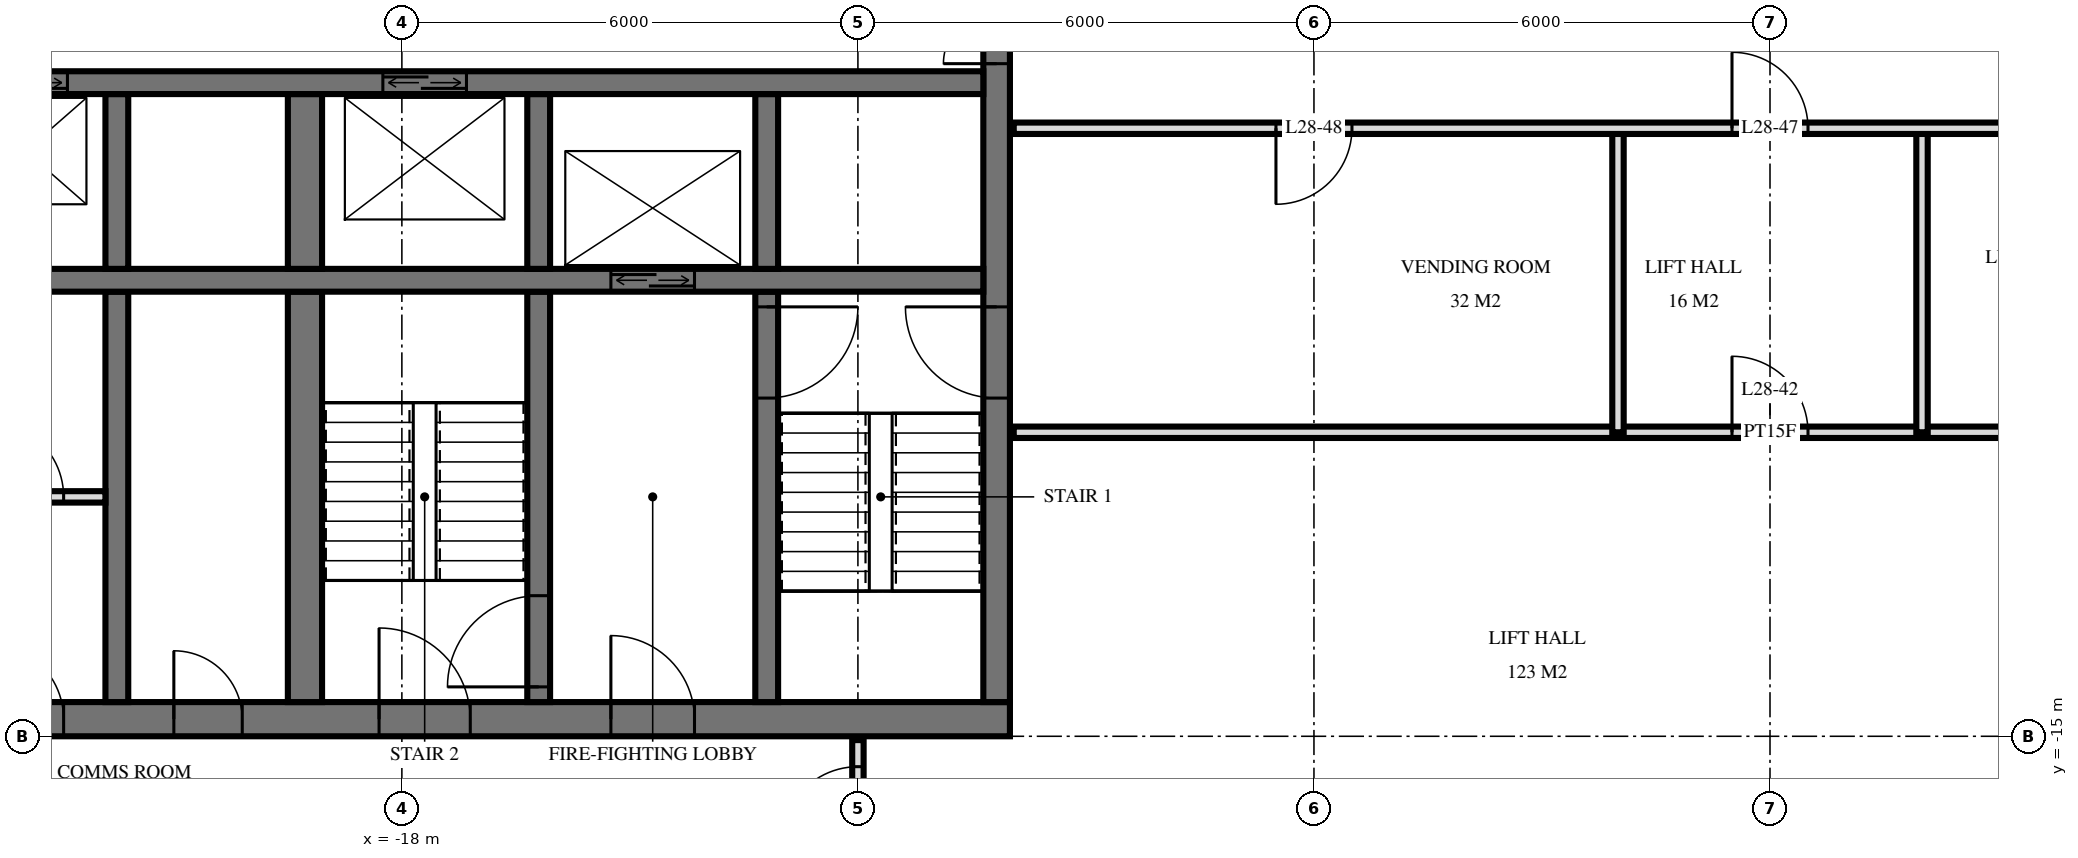
"""IFC4 building model, lengths in metres.
Left out: names, types, materials, properties, quantities, classifications, styles, units other than length and angle.
Written with IfcOpenShell. Run it as: python <this file> out.ifc"""

import sys

from ifc_helpers import new_model, si_unit, direction, frame, frame_2d, origin, place, context, subcontext, project, spatial, rectangle, extrude, element, fill, save


model = new_model("IFC4")
c1 = context("Model", 3, precision=1e-05, world=origin(), true_north=direction((0.0, 1.0)))
c2 = subcontext(c1, "Body", "Model", "MODEL_VIEW")
j1 = project(units=[si_unit("LENGTHUNIT", "METRE"), si_unit("PLANEANGLEUNIT", "RADIAN")], contexts=[c1])
p1 = place(None, origin())
s1 = spatial("IfcSite", under=j1, at=p1, CompositionType="ELEMENT")
p2 = place(p1, origin())
s2 = spatial("IfcBuilding", under=s1, at=p2, CompositionType="ELEMENT")
p3 = place(p2, frame((0.0, 0.0, 112.8)))
s3 = spatial("IfcBuildingStorey", under=s2, at=p3, CompositionType="ELEMENT", Elevation=112.8)
p4 = place(p3, frame((-24.5, -14.775, 0.0), z_axis=(0.0, 0.0, 1.0), x_axis=(1.0, 0.0, 0.0)))
e1 = element("IfcWall", 1, at=p4, inside=s3, PredefinedType="SHEAR", context=c2, shape_type="SweptSolid", body=[
    extrude(rectangle(XDim=14.5, YDim=0.45, at=frame_2d((7.25, 0.0))), origin(), (0.0, 0.0, 1.0), 3.6),
])
p5 = place(p4, frame((6.2, 0.0, 0.0)))
e2 = element("IfcOpeningElement", 2, at=p5, cuts=e1, PredefinedType="OPENING", context=c2, shape_type="SweptSolid", body=[
    extrude(rectangle(XDim=1.2, YDim=2.1, at=frame_2d((0.6, 1.05))), frame((0.0, 0.235, 0.0), z_axis=(0.0, -1.0, 0.0), x_axis=(1.0, 0.0, 0.0)), (0.0, 0.0, 1.0), 0.47),
])
p6 = place(p4, frame((9.25, 0.0, 0.0)))
e3 = element("IfcOpeningElement", 3, at=p6, cuts=e1, PredefinedType="OPENING", context=c2, shape_type="SweptSolid", body=[
    extrude(rectangle(XDim=1.1, YDim=2.1, at=frame_2d((0.55, 1.05))), frame((0.0, 0.235, 0.0), z_axis=(0.0, -1.0, 0.0), x_axis=(1.0, 0.0, 0.0)), (0.0, 0.0, 1.0), 0.47),
])
p7 = place(p4, frame((3.5, 0.0, 0.0)))
e4 = element("IfcOpeningElement", 4, at=p7, cuts=e1, PredefinedType="OPENING", context=c2, shape_type="SweptSolid", body=[
    extrude(rectangle(XDim=0.9, YDim=2.1, at=frame_2d((0.45, 1.05))), frame((0.0, 0.235, 0.0), z_axis=(0.0, -1.0, 0.0), x_axis=(1.0, 0.0, 0.0)), (0.0, 0.0, 1.0), 0.47),
])
p8 = place(p4, frame((1.05, 0.0, 0.0)))
e5 = element("IfcOpeningElement", 5, at=p8, cuts=e1, PredefinedType="OPENING", context=c2, shape_type="SweptSolid", body=[
    extrude(rectangle(XDim=1.0, YDim=2.1, at=frame_2d((0.5, 1.05))), frame((0.0, 0.235, 0.0), z_axis=(0.0, -1.0, 0.0), x_axis=(1.0, 0.0, 0.0)), (0.0, 0.0, 1.0), 0.47),
])
p9 = place(p3, frame((-10.175, -14.55, 0.0), z_axis=(0.0, 0.0, 1.0), x_axis=(0.0, 1.0, 0.0)))
e6 = element("IfcWall", 6, at=p9, inside=s3, PredefinedType="SHEAR", context=c2, shape_type="SweptSolid", body=[
    extrude(rectangle(XDim=14.1, YDim=0.35, at=frame_2d((7.05, 0.0))), origin(), (0.0, 0.0, 1.0), 3.6),
])
p10 = place(p9, frame((8.4, 0.0, 0.0)))
e7 = element("IfcOpeningElement", 7, at=p10, cuts=e6, PredefinedType="OPENING", context=c2, shape_type="SweptSolid", body=[
    extrude(rectangle(XDim=1.4, YDim=2.4, at=frame_2d((0.7, 1.2))), frame((0.0, 0.185, 0.0), z_axis=(0.0, -1.0, 0.0), x_axis=(1.0, 0.0, 0.0)), (0.0, 0.0, 1.0), 0.37),
])
p11 = place(p9, frame((10.0, 0.0, 0.0)))
e8 = element("IfcOpeningElement", 8, at=p11, cuts=e6, PredefinedType="OPENING", context=c2, shape_type="SweptSolid", body=[
    extrude(rectangle(XDim=1.4, YDim=2.4, at=frame_2d((0.7, 1.2))), frame((0.0, 0.185, 0.0), z_axis=(0.0, -1.0, 0.0), x_axis=(1.0, 0.0, 0.0)), (0.0, 0.0, 1.0), 0.37),
])
p12 = place(p9, frame((4.0, 0.0, 0.0)))
e9 = element("IfcOpeningElement", 9, at=p12, cuts=e6, PredefinedType="OPENING", context=c2, shape_type="SweptSolid", body=[
    extrude(rectangle(XDim=1.2, YDim=2.1, at=frame_2d((0.6, 1.05))), frame((0.0, 0.185, 0.0), z_axis=(0.0, -1.0, 0.0), x_axis=(1.0, 0.0, 0.0)), (0.0, 0.0, 1.0), 0.37),
])
p13 = place(p3, frame((-24.05, -6.4, 0.0), z_axis=(0.0, 0.0, 1.0), x_axis=(1.0, 0.0, 0.0)))
e10 = element("IfcWall", 10, at=p13, inside=s3, PredefinedType="SHEAR", context=c2, shape_type="SweptSolid", body=[
    extrude(rectangle(XDim=13.7, YDim=0.3, at=frame_2d((6.85, 0.0))), origin(), (0.0, 0.0, 1.0), 3.6),
])
p14 = place(p13, frame((0.55, 0.0, 0.0)))
e11 = element("IfcOpeningElement", 11, at=p14, cuts=e10, PredefinedType="OPENING", context=c2, shape_type="SweptSolid", body=[
    extrude(rectangle(XDim=1.1, YDim=2.1, at=frame_2d((0.55, 1.05))), frame((0.0, 0.16, 0.0), z_axis=(0.0, -1.0, 0.0), x_axis=(1.0, 0.0, 0.0)), (0.0, 0.0, 1.0), 0.32),
])
p15 = place(p13, frame((5.8, 0.0, 0.0)))
e12 = element("IfcOpeningElement", 12, at=p15, cuts=e10, PredefinedType="OPENING", context=c2, shape_type="SweptSolid", body=[
    extrude(rectangle(XDim=1.1, YDim=2.1, at=frame_2d((0.55, 1.05))), frame((0.0, 0.16, 0.0), z_axis=(0.0, -1.0, 0.0), x_axis=(1.0, 0.0, 0.0)), (0.0, 0.0, 1.0), 0.32),
])
p16 = place(p3, frame((-24.05, -9.0, 0.0), z_axis=(0.0, 0.0, 1.0), x_axis=(1.0, 0.0, 0.0)))
e13 = element("IfcWall", 13, at=p16, inside=s3, PredefinedType="SHEAR", context=c2, shape_type="SweptSolid", body=[
    extrude(rectangle(XDim=13.7, YDim=0.3, at=frame_2d((6.85, 0.0))), origin(), (0.0, 0.0, 1.0), 3.6),
])
p17 = place(p16, frame((8.8, 0.0, 0.0)))
e14 = element("IfcOpeningElement", 14, at=p17, cuts=e13, PredefinedType="OPENING", context=c2, shape_type="SweptSolid", body=[
    extrude(rectangle(XDim=1.1, YDim=2.1, at=frame_2d((0.55, 1.05))), frame((0.0, 0.16, 0.0), z_axis=(0.0, -1.0, 0.0), x_axis=(1.0, 0.0, 0.0)), (0.0, 0.0, 1.0), 0.32),
])
p18 = place(p3, frame((-13.2, -8.85, 0.0), z_axis=(0.0, 0.0, 1.0), x_axis=(0.0, 1.0, 0.0)))
e15 = element("IfcWall", 15, at=p18, inside=s3, PredefinedType="SHEAR", context=c2, shape_type="SweptSolid", body=[
    extrude(rectangle(XDim=2.3, YDim=0.3, at=frame_2d((1.15, 0.0))), origin(), (0.0, 0.0, 1.0), 3.6),
])
p19 = place(p3, frame((-13.2, -14.55, 0.0), z_axis=(0.0, 0.0, 1.0), x_axis=(0.0, 1.0, 0.0)))
e16 = element("IfcWall", 16, at=p19, inside=s3, PredefinedType="SHEAR", context=c2, shape_type="SweptSolid", body=[
    extrude(rectangle(XDim=5.4, YDim=0.3, at=frame_2d((2.7, 0.0))), origin(), (0.0, 0.0, 1.0), 3.6),
])
p20 = place(p19, frame((4.0, 0.0, 0.0)))
e17 = element("IfcOpeningElement", 17, at=p20, cuts=e16, PredefinedType="OPENING", context=c2, shape_type="SweptSolid", body=[
    extrude(rectangle(XDim=1.2, YDim=2.1, at=frame_2d((0.6, 1.05))), frame((0.0, 0.16, 0.0), z_axis=(0.0, -1.0, 0.0), x_axis=(1.0, 0.0, 0.0)), (0.0, 0.0, 1.0), 0.32),
])
p21 = place(p3, frame((-16.2, -8.85, 0.0), z_axis=(0.0, 0.0, 1.0), x_axis=(0.0, 1.0, 0.0)))
e18 = element("IfcWall", 18, at=p21, inside=s3, PredefinedType="SHEAR", context=c2, shape_type="SweptSolid", body=[
    extrude(rectangle(XDim=2.3, YDim=0.3, at=frame_2d((1.15, 0.0))), origin(), (0.0, 0.0, 1.0), 3.6),
])
p22 = place(p3, frame((-16.2, -14.55, 0.0), z_axis=(0.0, 0.0, 1.0), x_axis=(0.0, 1.0, 0.0)))
e19 = element("IfcWall", 19, at=p22, inside=s3, PredefinedType="SHEAR", context=c2, shape_type="SweptSolid", body=[
    extrude(rectangle(XDim=5.4, YDim=0.3, at=frame_2d((2.7, 0.0))), origin(), (0.0, 0.0, 1.0), 3.6),
])
p23 = place(p22, frame((0.2, 0.0, 0.0)))
e20 = element("IfcOpeningElement", 20, at=p23, cuts=e19, PredefinedType="OPENING", context=c2, shape_type="SweptSolid", body=[
    extrude(rectangle(XDim=1.2, YDim=2.1, at=frame_2d((0.6, 1.05))), frame((0.0, 0.16, 0.0), z_axis=(0.0, -1.0, 0.0), x_axis=(1.0, 0.0, 0.0)), (0.0, 0.0, 1.0), 0.32),
])
p24 = place(p3, frame((-19.275, -8.85, 0.0), z_axis=(0.0, 0.0, 1.0), x_axis=(0.0, 1.0, 0.0)))
e21 = element("IfcWall", 21, at=p24, inside=s3, PredefinedType="SHEAR", context=c2, shape_type="SweptSolid", body=[
    extrude(rectangle(XDim=2.3, YDim=0.45, at=frame_2d((1.15, 0.0))), origin(), (0.0, 0.0, 1.0), 3.6),
])
p25 = place(p3, frame((-19.275, -14.55, 0.0), z_axis=(0.0, 0.0, 1.0), x_axis=(0.0, 1.0, 0.0)))
e22 = element("IfcWall", 22, at=p25, inside=s3, PredefinedType="SHEAR", context=c2, shape_type="SweptSolid", body=[
    extrude(rectangle(XDim=5.4, YDim=0.45, at=frame_2d((2.7, 0.0))), origin(), (0.0, 0.0, 1.0), 3.6),
])
p26 = place(p3, frame((-21.75, -8.85, 0.0), z_axis=(0.0, 0.0, 1.0), x_axis=(0.0, 1.0, 0.0)))
e23 = element("IfcWall", 23, at=p26, inside=s3, PredefinedType="SHEAR", context=c2, shape_type="SweptSolid", body=[
    extrude(rectangle(XDim=2.3, YDim=0.3, at=frame_2d((1.15, 0.0))), origin(), (0.0, 0.0, 1.0), 3.6),
])
p27 = place(p3, frame((-21.75, -14.55, 0.0), z_axis=(0.0, 0.0, 1.0), x_axis=(0.0, 1.0, 0.0)))
e24 = element("IfcWall", 24, at=p27, inside=s3, PredefinedType="SHEAR", context=c2, shape_type="SweptSolid", body=[
    extrude(rectangle(XDim=5.4, YDim=0.3, at=frame_2d((2.7, 0.0))), origin(), (0.0, 0.0, 1.0), 3.6),
])
p28 = place(p3, frame((-24.0, -11.85, 0.0), z_axis=(0.0, 0.0, 1.0), x_axis=(1.0, 0.0, 0.0)))
e25 = element("IfcWall", 25, at=p28, inside=s3, PredefinedType="PARTITIONING", context=c2, shape_type="SweptSolid", body=[
    extrude(rectangle(XDim=2.1, YDim=0.15, at=frame_2d((1.05, 0.0))), origin(), (0.0, 0.0, 1.0), 3.3),
])
p29 = place(p28, frame((0.55, 0.0, 0.0)))
e26 = element("IfcOpeningElement", 26, at=p29, cuts=e25, PredefinedType="OPENING", context=c2, shape_type="SweptSolid", body=[
    extrude(rectangle(XDim=1.0, YDim=2.1, at=frame_2d((0.5, 1.05))), frame((0.0, 0.085, 0.0), z_axis=(0.0, -1.0, 0.0), x_axis=(1.0, 0.0, 0.0)), (0.0, 0.0, 1.0), 0.17),
])
for number, where, z_axis, x_axis in (
    (27, (2.0, -11.0, 0.0), (0.0, 0.0, 1.0), (0.0, 1.0, 0.0)),
    (28, (-2.0, -11.0, 0.0), (0.0, 0.0, 1.0), (0.0, 1.0, 0.0)),
):
    element("IfcWall", number, at=place(p3, frame(where, z_axis=z_axis, x_axis=x_axis)), inside=s3, PredefinedType="PARTITIONING", context=c2, shape_type="SweptSolid", body=[
        extrude(rectangle(XDim=4.0, YDim=0.15, at=frame_2d((2.0, 0.0))), origin(), (0.0, 0.0, 1.0), 3.32),
    ])
p30 = place(p3, frame((-12.0, -16.8, 0.0), z_axis=(0.0, 0.0, 1.0), x_axis=(0.0, 1.0, 0.0)))
e29 = element("IfcWall", 29, at=p30, inside=s3, PredefinedType="PARTITIONING", context=c2, shape_type="SweptSolid", body=[
    extrude(rectangle(XDim=1.75, YDim=0.15, at=frame_2d((0.875, 0.0))), origin(), (0.0, 0.0, 1.0), 3.32),
])
p31 = place(p30, frame((0.4, 0.0, 0.0)))
e30 = element("IfcOpeningElement", 30, at=p31, cuts=e29, PredefinedType="OPENING", context=c2, shape_type="SweptSolid", body=[
    extrude(rectangle(XDim=1.0, YDim=2.1, at=frame_2d((0.5, 1.05))), frame((0.0, 0.085, 0.0), z_axis=(0.0, -1.0, 0.0), x_axis=(1.0, 0.0, 0.0)), (0.0, 0.0, 1.0), 0.17),
])
p32 = place(p3, frame((-9.95, -11.0, 0.0), z_axis=(0.0, 0.0, 1.0), x_axis=(1.0, 0.0, 0.0)))
e31 = element("IfcWall", 31, at=p32, inside=s3, PredefinedType="PARTITIONING", context=c2, shape_type="SweptSolid", body=[
    extrude(rectangle(XDim=19.9, YDim=0.15, at=frame_2d((9.95, 0.0))), origin(), (0.0, 0.0, 1.0), 3.32),
])
p33 = place(p32, frame((9.45, 0.0, 0.0)))
e32 = element("IfcOpeningElement", 32, at=p33, cuts=e31, PredefinedType="OPENING", context=c2, shape_type="SweptSolid", body=[
    extrude(rectangle(XDim=1.0, YDim=2.1, at=frame_2d((0.5, 1.05))), frame((0.0, 0.085, 0.0), z_axis=(0.0, -1.0, 0.0), x_axis=(1.0, 0.0, 0.0)), (0.0, 0.0, 1.0), 0.17),
])
p34 = place(p32, frame((15.45, 0.0, 0.0)))
e33 = element("IfcOpeningElement", 33, at=p34, cuts=e31, PredefinedType="OPENING", context=c2, shape_type="SweptSolid", body=[
    extrude(rectangle(XDim=1.0, YDim=2.1, at=frame_2d((0.5, 1.05))), frame((0.0, 0.085, 0.0), z_axis=(0.0, -1.0, 0.0), x_axis=(1.0, 0.0, 0.0)), (0.0, 0.0, 1.0), 0.17),
])
p35 = place(p3, frame((-9.95, -7.0, 0.0), z_axis=(0.0, 0.0, 1.0), x_axis=(1.0, 0.0, 0.0)))
e34 = element("IfcWall", 34, at=p35, inside=s3, PredefinedType="PARTITIONING", context=c2, shape_type="SweptSolid", body=[
    extrude(rectangle(XDim=19.9, YDim=0.15, at=frame_2d((9.95, 0.0))), origin(), (0.0, 0.0, 1.0), 3.32),
])
p36 = place(p35, frame((9.45, 0.0, 0.0)))
e35 = element("IfcOpeningElement", 35, at=p36, cuts=e34, PredefinedType="OPENING", context=c2, shape_type="SweptSolid", body=[
    extrude(rectangle(XDim=1.0, YDim=2.1, at=frame_2d((0.5, 1.05))), frame((0.0, 0.085, 0.0), z_axis=(0.0, -1.0, 0.0), x_axis=(1.0, 0.0, 0.0)), (0.0, 0.0, 1.0), 0.17),
])
p37 = place(p35, frame((3.45, 0.0, 0.0)))
e36 = element("IfcOpeningElement", 36, at=p37, cuts=e34, PredefinedType="OPENING", context=c2, shape_type="SweptSolid", body=[
    extrude(rectangle(XDim=1.0, YDim=2.1, at=frame_2d((0.5, 1.05))), frame((0.0, 0.085, 0.0), z_axis=(0.0, -1.0, 0.0), x_axis=(1.0, 0.0, 0.0)), (0.0, 0.0, 1.0), 0.17),
])
p38 = place(p14, origin())
e37 = element("IfcDoor", 37, at=p38, inside=s3, OperationType="DOUBLE_DOOR_SLIDING", PredefinedType="USERDEFINED", context=c2, shape_type="SweptSolid", body=[
    extrude(rectangle(XDim=1.1, YDim=2.1, at=frame_2d((0.55, 1.05))), frame((0.0, 0.025, 0.0), z_axis=(0.0, -1.0, 0.0), x_axis=(1.0, 0.0, 0.0)), (0.0, 0.0, 1.0), 0.05),
])
fill(e11, e37)
p39 = place(p17, origin())
e38 = element("IfcDoor", 38, at=p39, inside=s3, OperationType="DOUBLE_DOOR_SLIDING", PredefinedType="USERDEFINED", context=c2, shape_type="SweptSolid", body=[
    extrude(rectangle(XDim=1.1, YDim=2.1, at=frame_2d((0.55, 1.05))), frame((0.0, 0.025, 0.0), z_axis=(0.0, -1.0, 0.0), x_axis=(1.0, 0.0, 0.0)), (0.0, 0.0, 1.0), 0.05),
])
fill(e14, e38)
p40 = place(p15, origin())
e39 = element("IfcDoor", 39, at=p40, inside=s3, OperationType="DOUBLE_DOOR_SLIDING", PredefinedType="USERDEFINED", context=c2, shape_type="SweptSolid", body=[
    extrude(rectangle(XDim=1.1, YDim=2.1, at=frame_2d((0.55, 1.05))), frame((0.0, 0.025, 0.0), z_axis=(0.0, -1.0, 0.0), x_axis=(1.0, 0.0, 0.0)), (0.0, 0.0, 1.0), 0.05),
])
fill(e12, e39)
p41 = place(p10, origin())
e40 = element("IfcDoor", 40, at=p41, inside=s3, OperationType="DOUBLE_DOOR_SINGLE_SWING", PredefinedType="DOOR", context=c2, shape_type="SweptSolid", body=[
    extrude(rectangle(XDim=1.4, YDim=2.4, at=frame_2d((0.7, 1.2))), frame((0.0, 0.025, 0.0), z_axis=(0.0, -1.0, 0.0), x_axis=(1.0, 0.0, 0.0)), (0.0, 0.0, 1.0), 0.05),
])
fill(e7, e40)
p42 = place(p12, origin())
e41 = element("IfcDoor", 41, at=p42, inside=s3, OperationType="SINGLE_SWING_LEFT", PredefinedType="DOOR", context=c2, shape_type="SweptSolid", body=[
    extrude(rectangle(XDim=1.2, YDim=2.1, at=frame_2d((0.6, 1.05))), frame((0.0, 0.025, 0.0), z_axis=(0.0, -1.0, 0.0), x_axis=(1.0, 0.0, 0.0)), (0.0, 0.0, 1.0), 0.05),
])
fill(e9, e41)
p43 = place(p5, origin())
e42 = element("IfcDoor", 42, at=p43, inside=s3, OperationType="SINGLE_SWING_RIGHT", PredefinedType="DOOR", context=c2, shape_type="SweptSolid", body=[
    extrude(rectangle(XDim=1.2, YDim=2.1, at=frame_2d((0.6, 1.05))), frame((0.0, 0.025, 0.0), z_axis=(0.0, -1.0, 0.0), x_axis=(1.0, 0.0, 0.0)), (0.0, 0.0, 1.0), 0.05),
])
fill(e2, e42)
p44 = place(p6, origin())
e43 = element("IfcDoor", 43, at=p44, inside=s3, OperationType="SINGLE_SWING_RIGHT", PredefinedType="DOOR", context=c2, shape_type="SweptSolid", body=[
    extrude(rectangle(XDim=1.1, YDim=2.1, at=frame_2d((0.55, 1.05))), frame((0.0, 0.025, 0.0), z_axis=(0.0, -1.0, 0.0), x_axis=(1.0, 0.0, 0.0)), (0.0, 0.0, 1.0), 0.05),
])
fill(e3, e43)
p45 = place(p7, origin())
e44 = element("IfcDoor", 44, at=p45, inside=s3, OperationType="SINGLE_SWING_RIGHT", PredefinedType="DOOR", context=c2, shape_type="SweptSolid", body=[
    extrude(rectangle(XDim=0.9, YDim=2.1, at=frame_2d((0.45, 1.05))), frame((0.0, 0.025, 0.0), z_axis=(0.0, -1.0, 0.0), x_axis=(1.0, 0.0, 0.0)), (0.0, 0.0, 1.0), 0.05),
])
fill(e4, e44)
p46 = place(p8, origin())
e45 = element("IfcDoor", 45, at=p46, inside=s3, OperationType="SINGLE_SWING_RIGHT", PredefinedType="DOOR", context=c2, shape_type="SweptSolid", body=[
    extrude(rectangle(XDim=1.0, YDim=2.1, at=frame_2d((0.5, 1.05))), frame((0.0, 0.025, 0.0), z_axis=(0.0, -1.0, 0.0), x_axis=(1.0, 0.0, 0.0)), (0.0, 0.0, 1.0), 0.05),
])
fill(e5, e45)
p47 = place(p20, frame((0.6, 0.0, 0.0), z_axis=(0.0, 0.0, 1.0), x_axis=(-1.0, 0.0, 0.0)))
e46 = element("IfcDoor", 46, at=p47, inside=s3, OperationType="SINGLE_SWING_RIGHT", PredefinedType="DOOR", context=c2, shape_type="SweptSolid", body=[
    extrude(rectangle(XDim=1.2, YDim=2.1, at=frame_2d((0.0, 1.05))), frame((0.0, -0.025, 0.0), z_axis=(0.0, 1.0, 0.0), x_axis=(-1.0, 0.0, 0.0)), (0.0, 0.0, 1.0), 0.05),
])
fill(e17, e46)
p48 = place(p23, origin())
e47 = element("IfcDoor", 47, at=p48, inside=s3, OperationType="SINGLE_SWING_RIGHT", PredefinedType="DOOR", context=c2, shape_type="SweptSolid", body=[
    extrude(rectangle(XDim=1.2, YDim=2.1, at=frame_2d((0.6, 1.05))), frame((0.0, 0.025, 0.0), z_axis=(0.0, -1.0, 0.0), x_axis=(1.0, 0.0, 0.0)), (0.0, 0.0, 1.0), 0.05),
])
fill(e20, e47)
p49 = place(p29, origin())
e48 = element("IfcDoor", 48, at=p49, inside=s3, OperationType="SINGLE_SWING_RIGHT", PredefinedType="DOOR", context=c2, shape_type="SweptSolid", body=[
    extrude(rectangle(XDim=1.0, YDim=2.1, at=frame_2d((0.5, 1.05))), frame((0.0, 0.025, 0.0), z_axis=(0.0, -1.0, 0.0), x_axis=(1.0, 0.0, 0.0)), (0.0, 0.0, 1.0), 0.05),
])
fill(e26, e48)
p50 = place(p31, origin())
e49 = element("IfcDoor", 49, at=p50, inside=s3, OperationType="SINGLE_SWING_RIGHT", PredefinedType="DOOR", context=c2, shape_type="SweptSolid", body=[
    extrude(rectangle(XDim=1.0, YDim=2.1, at=frame_2d((0.5, 1.05))), frame((0.0, 0.025, 0.0), z_axis=(0.0, -1.0, 0.0), x_axis=(1.0, 0.0, 0.0)), (0.0, 0.0, 1.0), 0.05),
])
fill(e30, e49)
p51 = place(p33, origin())
e50 = element("IfcDoor", 50, at=p51, inside=s3, OperationType="SINGLE_SWING_RIGHT", PredefinedType="DOOR", context=c2, shape_type="SweptSolid", body=[
    extrude(rectangle(XDim=1.0, YDim=2.1, at=frame_2d((0.5, 1.05))), frame((0.0, 0.025, 0.0), z_axis=(0.0, -1.0, 0.0), x_axis=(1.0, 0.0, 0.0)), (0.0, 0.0, 1.0), 0.05),
])
fill(e32, e50)
p52 = place(p36, origin())
e51 = element("IfcDoor", 51, at=p52, inside=s3, OperationType="SINGLE_SWING_RIGHT", PredefinedType="DOOR", context=c2, shape_type="SweptSolid", body=[
    extrude(rectangle(XDim=1.0, YDim=2.1, at=frame_2d((0.5, 1.05))), frame((0.0, 0.025, 0.0), z_axis=(0.0, -1.0, 0.0), x_axis=(1.0, 0.0, 0.0)), (0.0, 0.0, 1.0), 0.05),
])
fill(e35, e51)
p53 = place(p37, frame((0.5, 0.0, 0.0), z_axis=(0.0, 0.0, 1.0), x_axis=(-1.0, 0.0, 0.0)))
e52 = element("IfcDoor", 52, at=p53, inside=s3, OperationType="SINGLE_SWING_LEFT", PredefinedType="DOOR", context=c2, shape_type="SweptSolid", body=[
    extrude(rectangle(XDim=1.0, YDim=2.1, at=frame_2d((0.0, 1.05))), frame((0.0, -0.025, 0.0), z_axis=(0.0, 1.0, 0.0), x_axis=(-1.0, 0.0, 0.0)), (0.0, 0.0, 1.0), 0.05),
])
fill(e36, e52)
save(model, sys.argv[1])
